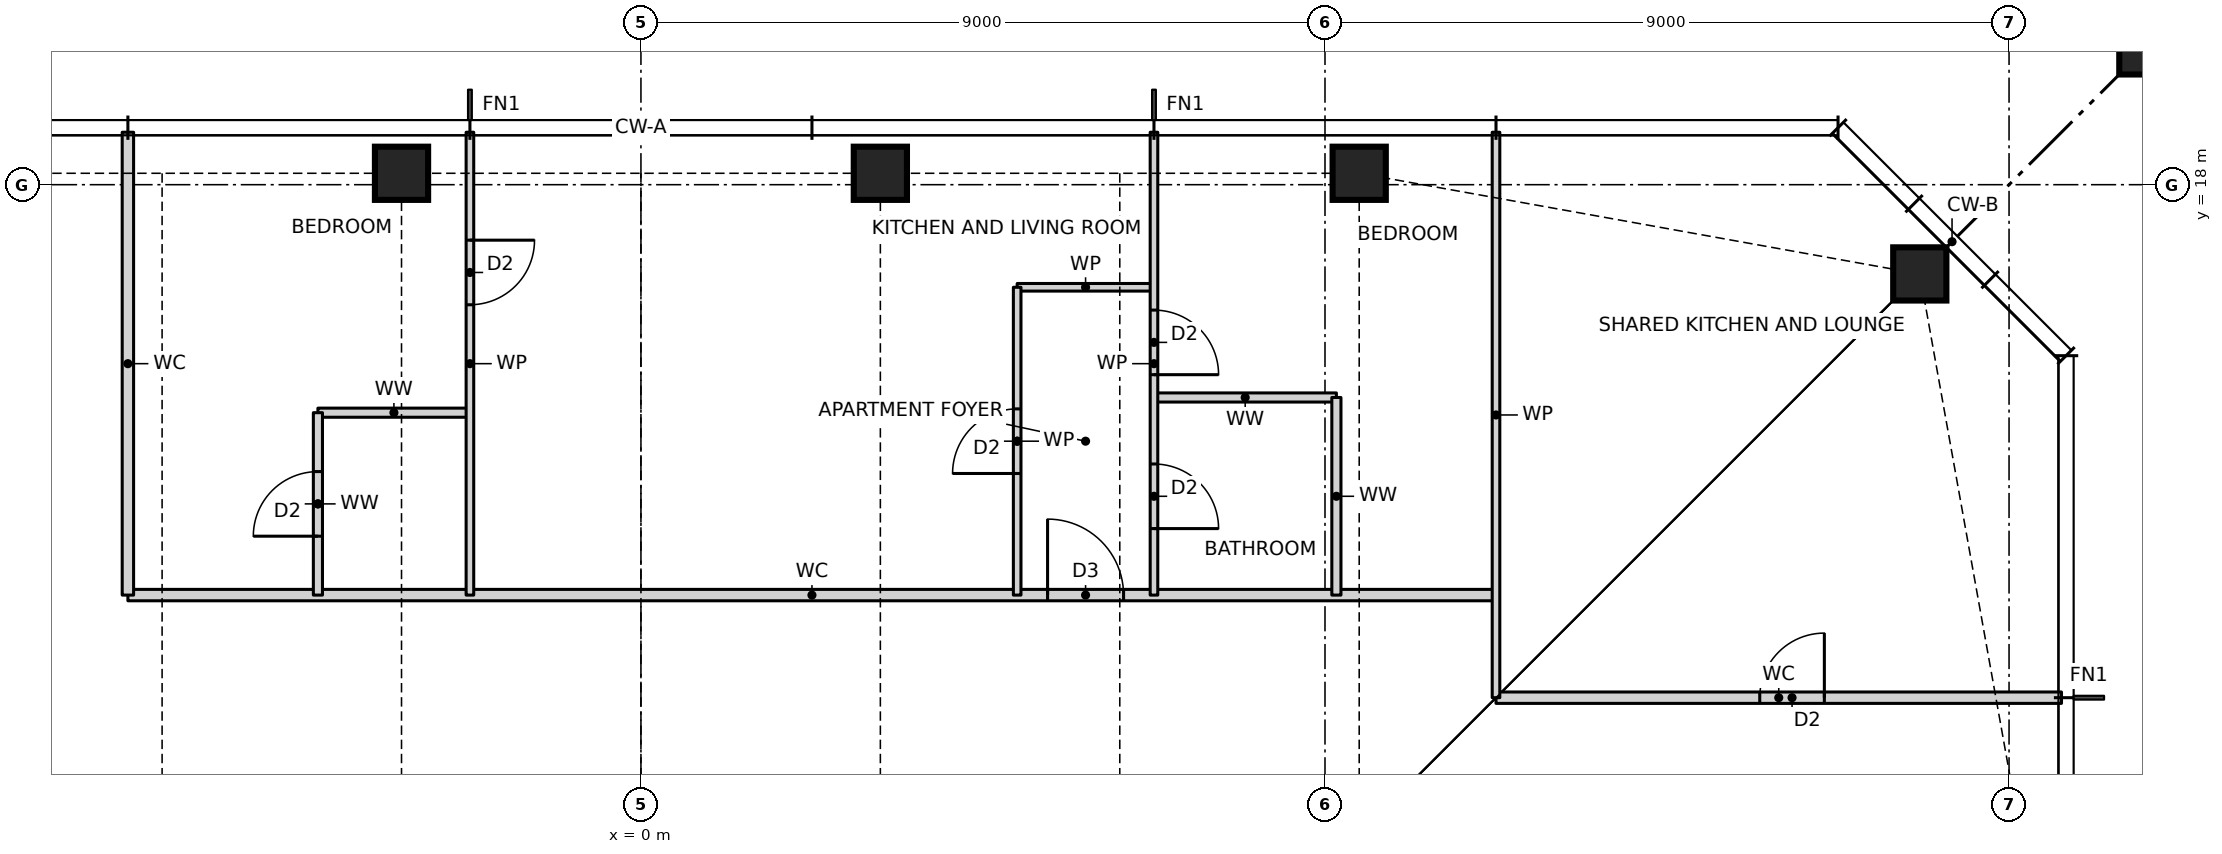
"""IFC4 building model, lengths in metres.
Left out: names, types, materials, properties, quantities, classifications, styles, units other than length and angle.
Written with IfcOpenShell. Run it as: python <this file> out.ifc"""

import sys

from ifc_helpers import new_model, si_unit, direction, frame, frame_2d, origin, origin_2d, place, context, subcontext, project, spatial, rectangle, hollow_rectangle, i_section, extrude, element, fill, save


model = new_model("IFC4")
c1 = context("Model", 3, precision=1e-05, world=origin(), true_north=direction((0.0, 1.0)))
c2 = subcontext(c1, "Body", "Model", "MODEL_VIEW")
j1 = project(units=[si_unit("LENGTHUNIT", "METRE"), si_unit("PLANEANGLEUNIT", "RADIAN")], contexts=[c1])
p1 = place(None, origin())
s1 = spatial("IfcSite", under=j1, at=p1, CompositionType="ELEMENT")
p2 = place(p1, origin())
s2 = spatial("IfcBuilding", under=s1, at=p2, CompositionType="ELEMENT")
p3 = place(p2, frame((0.0, 0.0, 177.5)))
s3 = spatial("IfcBuildingStorey", under=s2, at=p3, CompositionType="ELEMENT", Elevation=177.5)
for number, where, z_axis, x_axis in (
    (1, (16.826, 16.826, 0.0), (0.0, 0.0, 1.0), (1.0, 0.0, 0.0)),
    (2, (9.45, 18.15, 0.0), (0.0, 0.0, 1.0), (1.0, 0.0, 0.0)),
    (3, (3.15, 18.15, 0.0), (0.0, 0.0, 1.0), (1.0, 0.0, 0.0)),
    (4, (-3.15, 18.15, 0.0), (0.0, 0.0, 1.0), (1.0, 0.0, 0.0)),
):
    element("IfcColumn", number, at=place(p3, frame(where, z_axis=z_axis, x_axis=x_axis)), inside=s3, PredefinedType="COLUMN", context=c2, shape_type="SweptSolid", body=[
        extrude(hollow_rectangle(XDim=0.7, YDim=0.7, WallThickness=0.06, at=origin_2d()), origin(), (0.0, 0.0, 1.0), 3.5),
    ])
p4 = place(p3, frame((21.65, 21.65, 0.0), z_axis=(0.0, 0.0, 1.0), x_axis=(1.0, 0.0, 0.0)))
e5 = element("IfcColumn", 5, at=p4, inside=s3, PredefinedType="COLUMN", context=c2, shape_type="SweptSolid", body=[
    extrude(rectangle(XDim=4.4, YDim=4.4, at=origin_2d()), origin(), (0.0, 0.0, 1.0), 3.5),
    extrude(i_section(OverallWidth=0.478, OverallDepth=0.599, WebThickness=0.1, FlangeThickness=0.14, at=origin_2d()), origin(), (0.0, 0.0, 1.0), 3.5),
])
p5 = place(p3, frame((11.25, 11.25, 0.0), z_axis=(0.0, 0.0, 1.0), x_axis=(1.0, 0.0, 0.0)))
e6 = element("IfcWall", 6, at=p5, inside=s3, PredefinedType="PARTITIONING", context=c2, shape_type="SweptSolid", body=[
    extrude(rectangle(XDim=7.44, YDim=0.15, at=frame_2d((3.72, 0.0))), origin(), (0.0, 0.0, 1.0), 3.27),
])
p6 = place(p5, frame((3.47, 0.0, 0.0)))
e7 = element("IfcOpeningElement", 7, at=p6, cuts=e6, PredefinedType="OPENING", context=c2, shape_type="SweptSolid", body=[
    extrude(rectangle(XDim=0.85, YDim=2.1, at=frame_2d((0.425, 1.05))), frame((0.0, 0.085, 0.0), z_axis=(0.0, -1.0, 0.0), x_axis=(1.0, 0.0, 0.0)), (0.0, 0.0, 1.0), 0.17),
])
p7 = place(p3, frame((-6.75, 12.6, 0.0), z_axis=(0.0, 0.0, 1.0), x_axis=(1.0, 0.0, 0.0)))
e8 = element("IfcWall", 8, at=p7, inside=s3, PredefinedType="PARTITIONING", context=c2, shape_type="SweptSolid", body=[
    extrude(rectangle(XDim=18.0, YDim=0.15, at=frame_2d((9.0, 0.0))), origin(), (0.0, 0.0, 1.0), 3.27),
])
p8 = place(p7, frame((12.1, 0.0, 0.0)))
e9 = element("IfcOpeningElement", 9, at=p8, cuts=e8, PredefinedType="OPENING", context=c2, shape_type="SweptSolid", body=[
    extrude(rectangle(XDim=1.0, YDim=2.1, at=frame_2d((0.5, 1.05))), frame((0.0, 0.085, 0.0), z_axis=(0.0, -1.0, 0.0), x_axis=(1.0, 0.0, 0.0)), (0.0, 0.0, 1.0), 0.17),
])
p9 = place(p3, frame((-4.25, 15.0, 0.0), z_axis=(0.0, 0.0, 1.0), x_axis=(1.0, 0.0, 0.0)))
e10 = element("IfcWall", 10, at=p9, inside=s3, PredefinedType="PARTITIONING", context=c2, shape_type="SweptSolid", body=[
    extrude(rectangle(XDim=2.0, YDim=0.12, at=frame_2d((1.0, 0.0))), origin(), (0.0, 0.0, 1.0), 3.27),
])
p10 = place(p3, frame((6.75, 15.2, 0.0), z_axis=(0.0, 0.0, 1.0), x_axis=(1.0, 0.0, 0.0)))
e11 = element("IfcWall", 11, at=p10, inside=s3, PredefinedType="PARTITIONING", context=c2, shape_type="SweptSolid", body=[
    extrude(rectangle(XDim=2.4, YDim=0.12, at=frame_2d((1.2, 0.0))), origin(), (0.0, 0.0, 1.0), 3.27),
])
p11 = place(p3, frame((4.95, 16.65, 0.0), z_axis=(0.0, 0.0, 1.0), x_axis=(1.0, 0.0, 0.0)))
e12 = element("IfcWall", 12, at=p11, inside=s3, PredefinedType="PARTITIONING", context=c2, shape_type="SweptSolid", body=[
    extrude(rectangle(XDim=1.8, YDim=0.1, at=frame_2d((0.9, 0.0))), origin(), (0.0, 0.0, 1.0), 3.27),
])
p12 = place(p3, frame((11.25, 11.25, 0.0), z_axis=(0.0, 0.0, 1.0), x_axis=(0.0, 1.0, 0.0)))
e13 = element("IfcWall", 13, at=p12, inside=s3, PredefinedType="PARTITIONING", context=c2, shape_type="SweptSolid", body=[
    extrude(rectangle(XDim=7.44, YDim=0.1, at=frame_2d((3.72, 0.0))), origin(), (0.0, 0.0, 1.0), 3.27),
])
p13 = place(p3, frame((9.15, 12.6, 0.0), z_axis=(0.0, 0.0, 1.0), x_axis=(0.0, 1.0, 0.0)))
e14 = element("IfcWall", 14, at=p13, inside=s3, PredefinedType="PARTITIONING", context=c2, shape_type="SweptSolid", body=[
    extrude(rectangle(XDim=2.6, YDim=0.12, at=frame_2d((1.3, 0.0))), origin(), (0.0, 0.0, 1.0), 3.27),
])
p14 = place(p3, frame((6.75, 12.6, 0.0), z_axis=(0.0, 0.0, 1.0), x_axis=(0.0, 1.0, 0.0)))
e15 = element("IfcWall", 15, at=p14, inside=s3, PredefinedType="PARTITIONING", context=c2, shape_type="SweptSolid", body=[
    extrude(rectangle(XDim=6.09, YDim=0.1, at=frame_2d((3.045, 0.0))), origin(), (0.0, 0.0, 1.0), 3.27),
])
p15 = place(p14, frame((2.9, 0.0, 0.0)))
e16 = element("IfcOpeningElement", 16, at=p15, cuts=e15, PredefinedType="OPENING", context=c2, shape_type="SweptSolid", body=[
    extrude(rectangle(XDim=0.85, YDim=2.1, at=frame_2d((0.425, 1.05))), frame((0.0, 0.06, 0.0), z_axis=(0.0, -1.0, 0.0), x_axis=(1.0, 0.0, 0.0)), (0.0, 0.0, 1.0), 0.12),
])
p16 = place(p14, frame((0.875, 0.0, 0.0)))
e17 = element("IfcOpeningElement", 17, at=p16, cuts=e15, PredefinedType="OPENING", context=c2, shape_type="SweptSolid", body=[
    extrude(rectangle(XDim=0.85, YDim=2.1, at=frame_2d((0.425, 1.05))), frame((0.0, 0.06, 0.0), z_axis=(0.0, -1.0, 0.0), x_axis=(1.0, 0.0, 0.0)), (0.0, 0.0, 1.0), 0.12),
])
p17 = place(p3, frame((4.95, 12.6, 0.0), z_axis=(0.0, 0.0, 1.0), x_axis=(0.0, 1.0, 0.0)))
e18 = element("IfcWall", 18, at=p17, inside=s3, PredefinedType="PARTITIONING", context=c2, shape_type="SweptSolid", body=[
    extrude(rectangle(XDim=4.05, YDim=0.1, at=frame_2d((2.025, 0.0))), origin(), (0.0, 0.0, 1.0), 3.27),
])
p18 = place(p17, frame((1.6, 0.0, 0.0)))
e19 = element("IfcOpeningElement", 19, at=p18, cuts=e18, PredefinedType="OPENING", context=c2, shape_type="SweptSolid", body=[
    extrude(rectangle(XDim=0.85, YDim=2.1, at=frame_2d((0.425, 1.05))), frame((0.0, 0.06, 0.0), z_axis=(0.0, -1.0, 0.0), x_axis=(1.0, 0.0, 0.0)), (0.0, 0.0, 1.0), 0.12),
])
p19 = place(p3, frame((-2.25, 12.6, 0.0), z_axis=(0.0, 0.0, 1.0), x_axis=(0.0, 1.0, 0.0)))
e20 = element("IfcWall", 20, at=p19, inside=s3, PredefinedType="PARTITIONING", context=c2, shape_type="SweptSolid", body=[
    extrude(rectangle(XDim=6.09, YDim=0.1, at=frame_2d((3.045, 0.0))), origin(), (0.0, 0.0, 1.0), 3.27),
])
p20 = place(p19, frame((3.82, 0.0, 0.0)))
e21 = element("IfcOpeningElement", 21, at=p20, cuts=e20, PredefinedType="OPENING", context=c2, shape_type="SweptSolid", body=[
    extrude(rectangle(XDim=0.85, YDim=2.1, at=frame_2d((0.425, 1.05))), frame((0.0, 0.06, 0.0), z_axis=(0.0, -1.0, 0.0), x_axis=(1.0, 0.0, 0.0)), (0.0, 0.0, 1.0), 0.12),
])
p21 = place(p3, frame((-4.25, 12.6, 0.0), z_axis=(0.0, 0.0, 1.0), x_axis=(0.0, 1.0, 0.0)))
e22 = element("IfcWall", 22, at=p21, inside=s3, PredefinedType="PARTITIONING", context=c2, shape_type="SweptSolid", body=[
    extrude(rectangle(XDim=2.4, YDim=0.12, at=frame_2d((1.2, 0.0))), origin(), (0.0, 0.0, 1.0), 3.27),
])
p22 = place(p21, frame((0.775, 0.0, 0.0)))
e23 = element("IfcOpeningElement", 23, at=p22, cuts=e22, PredefinedType="OPENING", context=c2, shape_type="SweptSolid", body=[
    extrude(rectangle(XDim=0.85, YDim=2.1, at=frame_2d((0.425, 1.05))), frame((0.0, 0.07, 0.0), z_axis=(0.0, -1.0, 0.0), x_axis=(1.0, 0.0, 0.0)), (0.0, 0.0, 1.0), 0.14),
])
p23 = place(p3, frame((-6.75, 12.6, 0.0), z_axis=(0.0, 0.0, 1.0), x_axis=(0.0, 1.0, 0.0)))
e24 = element("IfcWall", 24, at=p23, inside=s3, PredefinedType="PARTITIONING", context=c2, shape_type="SweptSolid", body=[
    extrude(rectangle(XDim=6.09, YDim=0.15, at=frame_2d((3.045, 0.0))), origin(), (0.0, 0.0, 1.0), 3.27),
])
p24 = place(p8, origin())
e25 = element("IfcDoor", 25, at=p24, inside=s3, OperationType="SINGLE_SWING_LEFT", PredefinedType="DOOR", context=c2, shape_type="SweptSolid", body=[
    extrude(rectangle(XDim=1.0, YDim=2.1, at=frame_2d((0.5, 1.05))), frame((0.0, 0.025, 0.0), z_axis=(0.0, -1.0, 0.0), x_axis=(1.0, 0.0, 0.0)), (0.0, 0.0, 1.0), 0.05),
])
fill(e9, e25)
p25 = place(p18, origin())
e26 = element("IfcDoor", 26, at=p25, inside=s3, OperationType="SINGLE_SWING_LEFT", PredefinedType="DOOR", context=c2, shape_type="SweptSolid", body=[
    extrude(rectangle(XDim=0.85, YDim=2.1, at=frame_2d((0.425, 1.05))), frame((0.0, 0.025, 0.0), z_axis=(0.0, -1.0, 0.0), x_axis=(1.0, 0.0, 0.0)), (0.0, 0.0, 1.0), 0.05),
])
fill(e19, e26)
p26 = place(p15, frame((0.85, 0.0, 0.0), z_axis=(0.0, 0.0, 1.0), x_axis=(-1.0, 0.0, 0.0)))
e27 = element("IfcDoor", 27, at=p26, inside=s3, OperationType="SINGLE_SWING_RIGHT", PredefinedType="DOOR", context=c2, shape_type="SweptSolid", body=[
    extrude(rectangle(XDim=0.85, YDim=2.1, at=frame_2d((0.425, 1.05))), frame((0.0, 0.025, 0.0), z_axis=(0.0, -1.0, 0.0), x_axis=(1.0, 0.0, 0.0)), (0.0, 0.0, 1.0), 0.05),
])
fill(e16, e27)
p27 = place(p16, frame((0.85, 0.0, 0.0), z_axis=(0.0, 0.0, 1.0), x_axis=(-1.0, 0.0, 0.0)))
e28 = element("IfcDoor", 28, at=p27, inside=s3, OperationType="SINGLE_SWING_RIGHT", PredefinedType="DOOR", context=c2, shape_type="SweptSolid", body=[
    extrude(rectangle(XDim=0.85, YDim=2.1, at=frame_2d((0.425, 1.05))), frame((0.0, 0.025, 0.0), z_axis=(0.0, -1.0, 0.0), x_axis=(1.0, 0.0, 0.0)), (0.0, 0.0, 1.0), 0.05),
])
fill(e17, e28)
p28 = place(p20, frame((0.85, 0.0, 0.0), z_axis=(0.0, 0.0, 1.0), x_axis=(-1.0, 0.0, 0.0)))
e29 = element("IfcDoor", 29, at=p28, inside=s3, OperationType="SINGLE_SWING_LEFT", PredefinedType="DOOR", context=c2, shape_type="SweptSolid", body=[
    extrude(rectangle(XDim=0.85, YDim=2.1, at=frame_2d((0.425, 1.05))), frame((0.0, 0.025, 0.0), z_axis=(0.0, -1.0, 0.0), x_axis=(1.0, 0.0, 0.0)), (0.0, 0.0, 1.0), 0.05),
])
fill(e21, e29)
p29 = place(p22, origin())
e30 = element("IfcDoor", 30, at=p29, inside=s3, OperationType="SINGLE_SWING_LEFT", PredefinedType="DOOR", context=c2, shape_type="SweptSolid", body=[
    extrude(rectangle(XDim=0.85, YDim=2.1, at=frame_2d((0.425, 1.05))), frame((0.0, 0.025, 0.0), z_axis=(0.0, -1.0, 0.0), x_axis=(1.0, 0.0, 0.0)), (0.0, 0.0, 1.0), 0.05),
])
fill(e23, e30)
p30 = place(p6, origin())
e31 = element("IfcDoor", 31, at=p30, inside=s3, OperationType="SINGLE_SWING_RIGHT", PredefinedType="DOOR", context=c2, shape_type="SweptSolid", body=[
    extrude(rectangle(XDim=0.85, YDim=2.1, at=frame_2d((0.425, 1.05))), frame((0.0, 0.025, 0.0), z_axis=(0.0, -1.0, 0.0), x_axis=(1.0, 0.0, 0.0)), (0.0, 0.0, 1.0), 0.05),
])
fill(e7, e31)
save(model, sys.argv[1])
